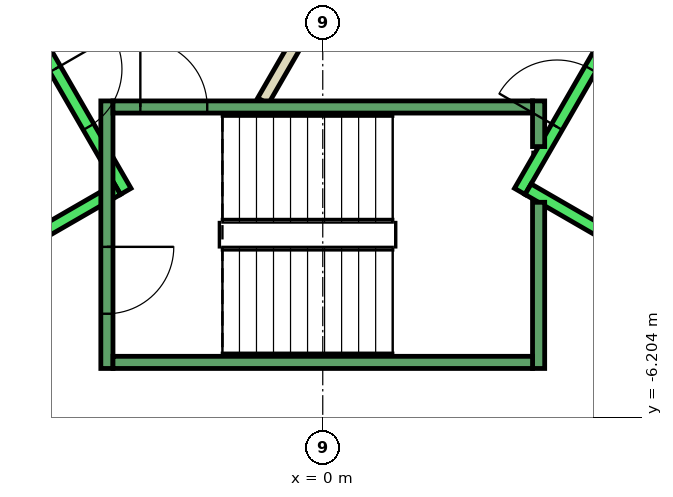
"""IFC4 building model, lengths in metres.
Left out: names, types, materials, properties, quantities, classifications, styles, units other than length and angle.
Written with IfcOpenShell. Run it as: python <this file> out.ifc"""

import sys

from ifc_helpers import new_model, si_unit, direction, frame, frame_2d, origin, place, context, subcontext, project, spatial, rectangle, extrude, element, fill, save


model = new_model("IFC4")
c1 = context("Model", 3, precision=1e-05, world=origin(), true_north=direction((0.0, 1.0)))
c2 = subcontext(c1, "Body", "Model", "MODEL_VIEW")
j1 = project(units=[si_unit("LENGTHUNIT", "METRE"), si_unit("PLANEANGLEUNIT", "RADIAN")], contexts=[c1])
p1 = place(None, origin())
s1 = spatial("IfcSite", under=j1, at=p1, CompositionType="ELEMENT")
p2 = place(p1, origin())
s2 = spatial("IfcBuilding", under=s1, at=p2, CompositionType="ELEMENT")
p3 = place(p2, frame((0.0, 0.0, 277.4)))
s3 = spatial("IfcBuildingStorey", under=s2, at=p3, CompositionType="ELEMENT", Elevation=277.4)
p4 = place(p3, frame((-0.982, -1.0, 0.0), z_axis=(0.0, 0.0, 1.0), x_axis=(0.50024047865, 0.865886518847, 0.0)))
e1 = element("IfcWall", 1, at=p4, inside=s3, PredefinedType="PARTITIONING", context=c2, shape_type="SweptSolid", body=[
    extrude(rectangle(XDim=1.863, YDim=0.2, at=frame_2d((0.931, 0.0))), origin(), (0.0, 0.0, 1.0), 3.0),
])
p5 = place(p3, frame((-5.94, 2.188, 0.0), z_axis=(0.0, 0.0, 1.0), x_axis=(0.500034260056, -0.866005622828, 0.0)))
e2 = element("IfcWall", 2, at=p5, inside=s3, PredefinedType="STANDARD", context=c2, shape_type="SweptSolid", body=[
    extrude(rectangle(XDim=5.399, YDim=0.2, at=frame_2d((2.7, 0.0))), origin(), (0.0, 0.0, 1.0), 3.0),
])
p6 = place(p5, frame((3.075, 0.0, 0.0)))
e3 = element("IfcOpeningElement", 3, at=p6, cuts=e2, PredefinedType="OPENING", context=c2, shape_type="SweptSolid", body=[
    extrude(rectangle(XDim=1.1, YDim=2.1, at=frame_2d((0.55, 1.05))), frame((0.0, 0.11, 0.0), z_axis=(0.0, -1.0, 0.0), x_axis=(1.0, 0.0, 0.0)), (0.0, 0.0, 1.0), 0.22),
])
p7 = place(p5, frame((1.225, 0.0, 0.0)))
e4 = element("IfcOpeningElement", 4, at=p7, cuts=e2, PredefinedType="OPENING", context=c2, shape_type="SweptSolid", body=[
    extrude(rectangle(XDim=1.1, YDim=2.1, at=frame_2d((0.55, 1.05))), frame((0.0, 0.11, 0.0), z_axis=(0.0, -1.0, 0.0), x_axis=(1.0, 0.0, 0.0)), (0.0, 0.0, 1.0), 0.22),
])
p8 = place(p3, frame((-3.377, -2.452, 0.0), z_axis=(0.0, 0.0, 1.0), x_axis=(-0.865955154139, -0.50012165622, 0.0)))
e5 = element("IfcWall", 5, at=p8, inside=s3, PredefinedType="STANDARD", context=c2, shape_type="SweptSolid", body=[
    extrude(rectangle(XDim=2.4, YDim=0.2, at=frame_2d((1.2, 0.0))), origin(), (0.0, 0.0, 1.0), 3.0),
])
p9 = place(p3, frame((3.24, -2.488, 0.0), z_axis=(0.0, 0.0, 1.0), x_axis=(0.500034260056, 0.866005622828, 0.0)))
e6 = element("IfcWall", 6, at=p9, inside=s3, PredefinedType="STANDARD", context=c2, shape_type="SweptSolid", body=[
    extrude(rectangle(XDim=5.399, YDim=0.2, at=frame_2d((2.7, 0.0))), origin(), (0.0, 0.0, 1.0), 3.0),
])
p10 = place(p9, frame((3.075, 0.0, 0.0)))
e7 = element("IfcOpeningElement", 7, at=p10, cuts=e6, PredefinedType="OPENING", context=c2, shape_type="SweptSolid", body=[
    extrude(rectangle(XDim=1.1, YDim=2.1, at=frame_2d((0.55, 1.05))), frame((0.0, 0.11, 0.0), z_axis=(0.0, -1.0, 0.0), x_axis=(1.0, 0.0, 0.0)), (0.0, 0.0, 1.0), 0.22),
])
p11 = place(p9, frame((1.225, 0.0, 0.0)))
e8 = element("IfcOpeningElement", 8, at=p11, cuts=e6, PredefinedType="OPENING", context=c2, shape_type="SweptSolid", body=[
    extrude(rectangle(XDim=1.1, YDim=2.1, at=frame_2d((0.55, 1.05))), frame((0.0, 0.11, 0.0), z_axis=(0.0, -1.0, 0.0), x_axis=(1.0, 0.0, 0.0)), (0.0, 0.0, 1.0), 0.22),
])
p12 = place(p3, frame((3.377, -2.452, 0.0), z_axis=(0.0, 0.0, 1.0), x_axis=(0.865955154139, -0.50012165622, 0.0)))
e9 = element("IfcWall", 9, at=p12, inside=s3, PredefinedType="STANDARD", context=c2, shape_type="SweptSolid", body=[
    extrude(rectangle(XDim=2.4, YDim=0.2, at=frame_2d((1.2, 0.0))), origin(), (0.0, 0.0, 1.0), 3.0),
])
p13 = place(p3, frame((-3.55, -1.0, 0.0), z_axis=(0.0, 0.0, 1.0), x_axis=(0.0, -1.0, 0.0)))
e10 = element("IfcWall", 10, at=p13, inside=s3, PredefinedType="STANDARD", context=c2, shape_type="SweptSolid", body=[
    extrude(rectangle(XDim=4.4, YDim=0.2, at=frame_2d((2.2, 0.0))), origin(), (0.0, 0.0, 1.0), 3.0),
])
p14 = place(p13, frame((2.4, 0.0, 0.0)))
e11 = element("IfcOpeningElement", 11, at=p14, cuts=e10, PredefinedType="OPENING", context=c2, shape_type="SweptSolid", body=[
    extrude(rectangle(XDim=1.1, YDim=2.2, at=frame_2d((0.55, 1.1))), frame((0.0, 0.11, 0.0), z_axis=(0.0, -1.0, 0.0), x_axis=(1.0, 0.0, 0.0)), (0.0, 0.0, 1.0), 0.22),
])
p15 = place(p3, frame((3.55, -2.667, 0.0), z_axis=(0.0, 0.0, 1.0), x_axis=(0.0, -1.0, 0.0)))
e12 = element("IfcWall", 12, at=p15, inside=s3, PredefinedType="STANDARD", context=c2, shape_type="SweptSolid", body=[
    extrude(rectangle(XDim=2.733, YDim=0.2, at=frame_2d((1.366, 0.0))), origin(), (0.0, 0.0, 1.0), 3.0),
])
p16 = place(p3, frame((3.55, -1.0, 0.0), z_axis=(0.0, 0.0, 1.0), x_axis=(0.0, -1.0, 0.0)))
e13 = element("IfcWall", 13, at=p16, inside=s3, PredefinedType="STANDARD", context=c2, shape_type="SweptSolid", body=[
    extrude(rectangle(XDim=0.751, YDim=0.2, at=frame_2d((0.375, 0.0))), origin(), (0.0, 0.0, 1.0), 3.0),
])
p17 = place(p3, frame((-3.45, -1.1, 0.0), z_axis=(0.0, 0.0, 1.0), x_axis=(1.0, 0.0, 0.0)))
e14 = element("IfcWall", 14, at=p17, inside=s3, PredefinedType="STANDARD", context=c2, shape_type="SweptSolid", body=[
    extrude(rectangle(XDim=6.9, YDim=0.2, at=frame_2d((3.45, 0.0))), origin(), (0.0, 0.0, 1.0), 3.0),
])
p18 = place(p17, frame((0.45, 0.0, 0.0)))
e15 = element("IfcOpeningElement", 15, at=p18, cuts=e14, PredefinedType="OPENING", context=c2, shape_type="SweptSolid", body=[
    extrude(rectangle(XDim=1.1, YDim=2.2, at=frame_2d((0.55, 1.1))), frame((0.0, 0.11, 0.0), z_axis=(0.0, -1.0, 0.0), x_axis=(1.0, 0.0, 0.0)), (0.0, 0.0, 1.0), 0.22),
])
p19 = place(p3, frame((-3.45, -5.3, 0.0), z_axis=(0.0, 0.0, 1.0), x_axis=(1.0, 0.0, 0.0)))
e16 = element("IfcWall", 16, at=p19, inside=s3, PredefinedType="STANDARD", context=c2, shape_type="SweptSolid", body=[
    extrude(rectangle(XDim=6.9, YDim=0.2, at=frame_2d((3.45, 0.0))), origin(), (0.0, 0.0, 1.0), 3.0),
])
p20 = place(p6, origin())
e17 = element("IfcDoor", 17, at=p20, inside=s3, OperationType="SLIDING_TO_LEFT", PredefinedType="DOOR", context=c2, shape_type="SweptSolid", body=[
    extrude(rectangle(XDim=1.1, YDim=2.1, at=frame_2d((0.55, 1.05))), frame((0.0, 0.025, 0.0), z_axis=(0.0, -1.0, 0.0), x_axis=(1.0, 0.0, 0.0)), (0.0, 0.0, 1.0), 0.05),
])
fill(e3, e17)
p21 = place(p11, origin())
e18 = element("IfcDoor", 18, at=p21, inside=s3, OperationType="SLIDING_TO_LEFT", PredefinedType="DOOR", context=c2, shape_type="SweptSolid", body=[
    extrude(rectangle(XDim=1.1, YDim=2.1, at=frame_2d((0.55, 1.05))), frame((0.0, 0.025, 0.0), z_axis=(0.0, -1.0, 0.0), x_axis=(1.0, 0.0, 0.0)), (0.0, 0.0, 1.0), 0.05),
])
fill(e8, e18)
p22 = place(p18, origin())
e19 = element("IfcDoor", 19, at=p22, inside=s3, OperationType="SINGLE_SWING_LEFT", PredefinedType="DOOR", context=c2, shape_type="SweptSolid", body=[
    extrude(rectangle(XDim=1.1, YDim=2.2, at=frame_2d((0.55, 1.1))), frame((0.0, 0.025, 0.0), z_axis=(0.0, -1.0, 0.0), x_axis=(1.0, 0.0, 0.0)), (0.0, 0.0, 1.0), 0.05),
])
fill(e15, e19)
p23 = place(p14, origin())
e20 = element("IfcDoor", 20, at=p23, inside=s3, OperationType="SINGLE_SWING_LEFT", PredefinedType="DOOR", context=c2, shape_type="SweptSolid", body=[
    extrude(rectangle(XDim=1.1, YDim=2.2, at=frame_2d((0.55, 1.1))), frame((0.0, 0.025, 0.0), z_axis=(0.0, -1.0, 0.0), x_axis=(1.0, 0.0, 0.0)), (0.0, 0.0, 1.0), 0.05),
])
fill(e11, e20)
save(model, sys.argv[1])
